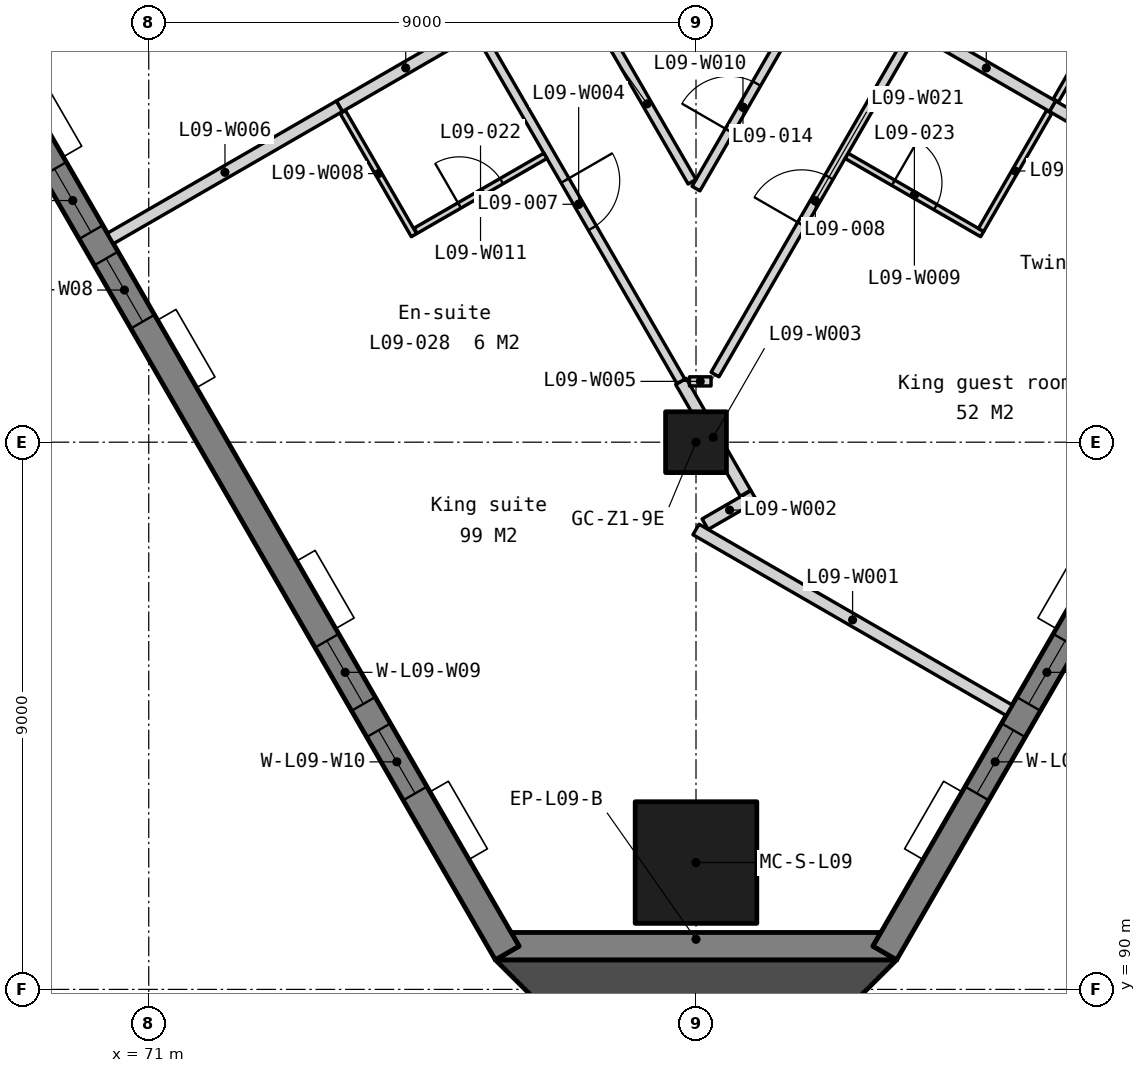
"""IFC4 building model, lengths in metres.
Left out: names, types, materials, properties, quantities, classifications, styles, units other than length and angle.
Written with IfcOpenShell. Run it as: python <this file> out.ifc"""

import sys

from ifc_helpers import new_model, si_unit, direction, frame, frame_2d, origin, origin_2d, place, context, subcontext, project, spatial, polyline, rectangle, outline, extrude, element, fill, save


model = new_model("IFC4")
c1 = context("Model", 3, precision=1e-05, world=origin(), true_north=direction((0.0, 1.0)))
c2 = subcontext(c1, "Body", "Model", "MODEL_VIEW")
j1 = project(units=[si_unit("LENGTHUNIT", "METRE"), si_unit("PLANEANGLEUNIT", "RADIAN")], contexts=[c1])
p1 = place(None, origin())
s1 = spatial("IfcSite", under=j1, at=p1, CompositionType="ELEMENT")
p2 = place(p1, origin())
s2 = spatial("IfcBuilding", under=s1, at=p2, CompositionType="ELEMENT")
p3 = place(p2, frame((0.0, 0.0, 45.5)))
s3 = spatial("IfcBuildingStorey", under=s2, at=p3, CompositionType="ELEMENT", Elevation=45.5)
p4 = place(p3, frame((80.0, 99.0, 0.0), z_axis=(0.0, 0.0, 1.0), x_axis=(1.0, 0.0, 0.0)))
e1 = element("IfcColumn", 1, at=p4, inside=s3, PredefinedType="COLUMN", context=c2, shape_type="SweptSolid", body=[
    extrude(rectangle(XDim=1.0, YDim=1.0, at=origin_2d()), origin(), (0.0, 0.0, 1.0), 3.5),
])
p5 = place(p3, frame((80.0, 92.086, 0.0), z_axis=(0.0, 0.0, 1.0), x_axis=(1.0, 0.0, 0.0)))
e2 = element("IfcColumn", 2, at=p5, inside=s3, PredefinedType="COLUMN", context=c2, shape_type="SweptSolid", body=[
    extrude(rectangle(XDim=2.0, YDim=2.0, at=origin_2d()), origin(), (0.0, 0.0, 1.0), 3.5),
])
p6 = place(p3, frame((0.0, 0.0, -0.15)))
e3 = element("IfcWall", 3, at=p6, inside=s3, PredefinedType="SOLIDWALL", context=c2, shape_type="SweptSolid", body=[
    extrude(outline(polyline([(76.7, 90.486), (77.09, 90.711), (76.96, 90.936), (83.04, 90.936), (82.91, 90.711), (83.3, 90.486), (76.7, 90.486)])), origin(), (0.0, 0.0, 1.0), 3.5),
])
p7 = place(p3, frame((54.495, 129.397, -0.15), z_axis=(0.0, 0.0, 1.0), x_axis=(0.499999201451, -0.866025864826, 0.0)))
e4 = element("IfcWall", 4, at=p7, inside=s3, PredefinedType="SOLIDWALL", context=c2, shape_type="SweptSolid", body=[
    extrude(outline(polyline([(44.8, 0.0), (44.8, 3.5), (0.0, 3.5), (0.0, 0.0), (44.8, 0.0)])), frame((0.0, 0.225, 0.0), z_axis=(0.0, -1.0, 0.0), x_axis=(1.0, 0.0, 0.0)), (0.0, 0.0, 1.0), 0.45),
])
p8 = place(p7, frame((3.03, 0.0, 1.05)))
e5 = element("IfcOpeningElement", 5, at=p8, cuts=e4, PredefinedType="OPENING", context=c2, shape_type="SweptSolid", body=[
    extrude(rectangle(XDim=1.2, YDim=1.5, at=frame_2d((0.6, 0.75))), frame((0.0, 0.235, 0.0), z_axis=(0.0, -1.0, 0.0), x_axis=(1.0, 0.0, 0.0)), (0.0, 0.0, 1.0), 0.47),
])
p9 = place(p7, frame((4.73, 0.0, 1.05)))
e6 = element("IfcOpeningElement", 6, at=p9, cuts=e4, PredefinedType="OPENING", context=c2, shape_type="SweptSolid", body=[
    extrude(rectangle(XDim=1.2, YDim=1.5, at=frame_2d((0.6, 0.75))), frame((0.0, 0.235, 0.0), z_axis=(0.0, -1.0, 0.0), x_axis=(1.0, 0.0, 0.0)), (0.0, 0.0, 1.0), 0.47),
])
p10 = place(p7, frame((11.99, 0.0, 1.05)))
e7 = element("IfcOpeningElement", 7, at=p10, cuts=e4, PredefinedType="OPENING", context=c2, shape_type="SweptSolid", body=[
    extrude(rectangle(XDim=1.2, YDim=1.5, at=frame_2d((0.6, 0.75))), frame((0.0, 0.235, 0.0), z_axis=(0.0, -1.0, 0.0), x_axis=(1.0, 0.0, 0.0)), (0.0, 0.0, 1.0), 0.47),
])
p11 = place(p7, frame((13.69, 0.0, 1.05)))
e8 = element("IfcOpeningElement", 8, at=p11, cuts=e4, PredefinedType="OPENING", context=c2, shape_type="SweptSolid", body=[
    extrude(rectangle(XDim=1.2, YDim=1.5, at=frame_2d((0.6, 0.75))), frame((0.0, 0.235, 0.0), z_axis=(0.0, -1.0, 0.0), x_axis=(1.0, 0.0, 0.0)), (0.0, 0.0, 1.0), 0.47),
])
p12 = place(p7, frame((20.95, 0.0, 1.05)))
e9 = element("IfcOpeningElement", 9, at=p12, cuts=e4, PredefinedType="OPENING", context=c2, shape_type="SweptSolid", body=[
    extrude(rectangle(XDim=1.2, YDim=1.5, at=frame_2d((0.6, 0.75))), frame((0.0, 0.235, 0.0), z_axis=(0.0, -1.0, 0.0), x_axis=(1.0, 0.0, 0.0)), (0.0, 0.0, 1.0), 0.47),
])
p13 = place(p7, frame((22.65, 0.0, 1.05)))
e10 = element("IfcOpeningElement", 10, at=p13, cuts=e4, PredefinedType="OPENING", context=c2, shape_type="SweptSolid", body=[
    extrude(rectangle(XDim=1.2, YDim=1.5, at=frame_2d((0.6, 0.75))), frame((0.0, 0.235, 0.0), z_axis=(0.0, -1.0, 0.0), x_axis=(1.0, 0.0, 0.0)), (0.0, 0.0, 1.0), 0.47),
])
p14 = place(p7, frame((29.91, 0.0, 1.05)))
e11 = element("IfcOpeningElement", 11, at=p14, cuts=e4, PredefinedType="OPENING", context=c2, shape_type="SweptSolid", body=[
    extrude(rectangle(XDim=1.2, YDim=1.5, at=frame_2d((0.6, 0.75))), frame((0.0, 0.235, 0.0), z_axis=(0.0, -1.0, 0.0), x_axis=(1.0, 0.0, 0.0)), (0.0, 0.0, 1.0), 0.47),
])
p15 = place(p7, frame((31.61, 0.0, 1.05)))
e12 = element("IfcOpeningElement", 12, at=p15, cuts=e4, PredefinedType="OPENING", context=c2, shape_type="SweptSolid", body=[
    extrude(rectangle(XDim=1.2, YDim=1.5, at=frame_2d((0.6, 0.75))), frame((0.0, 0.235, 0.0), z_axis=(0.0, -1.0, 0.0), x_axis=(1.0, 0.0, 0.0)), (0.0, 0.0, 1.0), 0.47),
])
p16 = place(p7, frame((38.87, 0.0, 1.05)))
e13 = element("IfcOpeningElement", 13, at=p16, cuts=e4, PredefinedType="OPENING", context=c2, shape_type="SweptSolid", body=[
    extrude(rectangle(XDim=1.2, YDim=1.5, at=frame_2d((0.6, 0.75))), frame((0.0, 0.235, 0.0), z_axis=(0.0, -1.0, 0.0), x_axis=(1.0, 0.0, 0.0)), (0.0, 0.0, 1.0), 0.47),
])
p17 = place(p7, frame((40.57, 0.0, 1.05)))
e14 = element("IfcOpeningElement", 14, at=p17, cuts=e4, PredefinedType="OPENING", context=c2, shape_type="SweptSolid", body=[
    extrude(rectangle(XDim=1.2, YDim=1.5, at=frame_2d((0.6, 0.75))), frame((0.0, 0.235, 0.0), z_axis=(0.0, -1.0, 0.0), x_axis=(1.0, 0.0, 0.0)), (0.0, 0.0, 1.0), 0.47),
])
p18 = place(p3, frame((83.105, 90.599, -0.15), z_axis=(0.0, 0.0, 1.0), x_axis=(0.499999201451, 0.866025864826, 0.0)))
e15 = element("IfcWall", 15, at=p18, inside=s3, PredefinedType="SOLIDWALL", context=c2, shape_type="SweptSolid", body=[
    extrude(outline(polyline([(44.8, 0.0), (44.8, 3.5), (0.0, 3.5), (0.0, 0.0), (44.8, 0.0)])), frame((0.0, 0.225, 0.0), z_axis=(0.0, -1.0, 0.0), x_axis=(1.0, 0.0, 0.0)), (0.0, 0.0, 1.0), 0.45),
])
p19 = place(p18, frame((3.03, 0.0, 1.05)))
e16 = element("IfcOpeningElement", 16, at=p19, cuts=e15, PredefinedType="OPENING", context=c2, shape_type="SweptSolid", body=[
    extrude(rectangle(XDim=1.2, YDim=1.5, at=frame_2d((0.6, 0.75))), frame((0.0, 0.235, 0.0), z_axis=(0.0, -1.0, 0.0), x_axis=(1.0, 0.0, 0.0)), (0.0, 0.0, 1.0), 0.47),
])
p20 = place(p18, frame((4.73, 0.0, 1.05)))
e17 = element("IfcOpeningElement", 17, at=p20, cuts=e15, PredefinedType="OPENING", context=c2, shape_type="SweptSolid", body=[
    extrude(rectangle(XDim=1.2, YDim=1.5, at=frame_2d((0.6, 0.75))), frame((0.0, 0.235, 0.0), z_axis=(0.0, -1.0, 0.0), x_axis=(1.0, 0.0, 0.0)), (0.0, 0.0, 1.0), 0.47),
])
p21 = place(p18, frame((11.99, 0.0, 1.05)))
e18 = element("IfcOpeningElement", 18, at=p21, cuts=e15, PredefinedType="OPENING", context=c2, shape_type="SweptSolid", body=[
    extrude(rectangle(XDim=1.2, YDim=1.5, at=frame_2d((0.6, 0.75))), frame((0.0, 0.235, 0.0), z_axis=(0.0, -1.0, 0.0), x_axis=(1.0, 0.0, 0.0)), (0.0, 0.0, 1.0), 0.47),
])
p22 = place(p18, frame((13.69, 0.0, 1.05)))
e19 = element("IfcOpeningElement", 19, at=p22, cuts=e15, PredefinedType="OPENING", context=c2, shape_type="SweptSolid", body=[
    extrude(rectangle(XDim=1.2, YDim=1.5, at=frame_2d((0.6, 0.75))), frame((0.0, 0.235, 0.0), z_axis=(0.0, -1.0, 0.0), x_axis=(1.0, 0.0, 0.0)), (0.0, 0.0, 1.0), 0.47),
])
p23 = place(p18, frame((20.95, 0.0, 1.05)))
e20 = element("IfcOpeningElement", 20, at=p23, cuts=e15, PredefinedType="OPENING", context=c2, shape_type="SweptSolid", body=[
    extrude(rectangle(XDim=1.2, YDim=1.5, at=frame_2d((0.6, 0.75))), frame((0.0, 0.235, 0.0), z_axis=(0.0, -1.0, 0.0), x_axis=(1.0, 0.0, 0.0)), (0.0, 0.0, 1.0), 0.47),
])
p24 = place(p18, frame((22.65, 0.0, 1.05)))
e21 = element("IfcOpeningElement", 21, at=p24, cuts=e15, PredefinedType="OPENING", context=c2, shape_type="SweptSolid", body=[
    extrude(rectangle(XDim=1.2, YDim=1.5, at=frame_2d((0.6, 0.75))), frame((0.0, 0.235, 0.0), z_axis=(0.0, -1.0, 0.0), x_axis=(1.0, 0.0, 0.0)), (0.0, 0.0, 1.0), 0.47),
])
p25 = place(p18, frame((29.91, 0.0, 1.05)))
e22 = element("IfcOpeningElement", 22, at=p25, cuts=e15, PredefinedType="OPENING", context=c2, shape_type="SweptSolid", body=[
    extrude(rectangle(XDim=1.2, YDim=1.5, at=frame_2d((0.6, 0.75))), frame((0.0, 0.235, 0.0), z_axis=(0.0, -1.0, 0.0), x_axis=(1.0, 0.0, 0.0)), (0.0, 0.0, 1.0), 0.47),
])
p26 = place(p18, frame((31.61, 0.0, 1.05)))
e23 = element("IfcOpeningElement", 23, at=p26, cuts=e15, PredefinedType="OPENING", context=c2, shape_type="SweptSolid", body=[
    extrude(rectangle(XDim=1.2, YDim=1.5, at=frame_2d((0.6, 0.75))), frame((0.0, 0.235, 0.0), z_axis=(0.0, -1.0, 0.0), x_axis=(1.0, 0.0, 0.0)), (0.0, 0.0, 1.0), 0.47),
])
p27 = place(p18, frame((38.87, 0.0, 1.05)))
e24 = element("IfcOpeningElement", 24, at=p27, cuts=e15, PredefinedType="OPENING", context=c2, shape_type="SweptSolid", body=[
    extrude(rectangle(XDim=1.2, YDim=1.5, at=frame_2d((0.6, 0.75))), frame((0.0, 0.235, 0.0), z_axis=(0.0, -1.0, 0.0), x_axis=(1.0, 0.0, 0.0)), (0.0, 0.0, 1.0), 0.47),
])
p28 = place(p18, frame((40.57, 0.0, 1.05)))
e25 = element("IfcOpeningElement", 25, at=p28, cuts=e15, PredefinedType="OPENING", context=c2, shape_type="SweptSolid", body=[
    extrude(rectangle(XDim=1.2, YDim=1.5, at=frame_2d((0.6, 0.75))), frame((0.0, 0.235, 0.0), z_axis=(0.0, -1.0, 0.0), x_axis=(1.0, 0.0, 0.0)), (0.0, 0.0, 1.0), 0.47),
])
p29 = place(p3, frame((0.0, 0.0, -0.15)))
e26 = element("IfcWall", 26, at=p29, inside=s3, PredefinedType="SOLIDWALL", context=c2, shape_type="SweptSolid", body=[
    extrude(outline(polyline([(76.7, 90.486), (80.0, 87.2), (83.3, 90.486), (76.7, 90.486)])), origin(), (0.0, 0.0, 1.0), 3.5),
])
p30 = place(p3, frame((80.0, 97.565, 0.0), z_axis=(0.0, 0.0, 1.0), x_axis=(0.866021515814, -0.500006734102, 0.0)))
e27 = element("IfcWall", 27, at=p30, inside=s3, PredefinedType="PARTITIONING", context=c2, shape_type="SweptSolid", body=[
    extrude(rectangle(XDim=5.947, YDim=0.2, at=frame_2d((2.974, 0.0))), origin(), (0.0, 0.0, 1.0), 3.35),
])
p31 = place(p3, frame((80.15, 97.651, 0.0), z_axis=(0.0, 0.0, 1.0), x_axis=(0.866084982889, 0.499896791762, 0.0)))
e28 = element("IfcWall", 28, at=p31, inside=s3, PredefinedType="PARTITIONING", context=c2, shape_type="SweptSolid", body=[
    extrude(rectangle(XDim=0.929, YDim=0.2, at=frame_2d((0.465, 0.0))), origin(), (0.0, 0.0, 1.0), 3.35),
])
p32 = place(p3, frame((79.752, 100.0, 0.0), z_axis=(0.0, 0.0, 1.0), x_axis=(0.499861813449, -0.866105171129, 0.0)))
e29 = element("IfcWall", 29, at=p32, inside=s3, PredefinedType="PARTITIONING", context=c2, shape_type="SweptSolid", body=[
    extrude(rectangle(XDim=2.123, YDim=0.2, at=frame_2d((1.062, 0.0))), origin(), (0.0, 0.0, 1.0), 3.35),
])
p33 = place(p3, frame((76.389, 105.826, 0.0), z_axis=(0.0, 0.0, 1.0), x_axis=(0.499980071345, -0.866036909293, 0.0)))
e30 = element("IfcWall", 30, at=p33, inside=s3, PredefinedType="PARTITIONING", context=c2, shape_type="SweptSolid", body=[
    extrude(rectangle(XDim=6.727, YDim=0.15, at=frame_2d((3.363, 0.0))), origin(), (0.0, 0.0, 1.0), 3.35),
])
p34 = place(p33, frame((2.914, 0.0, 0.0)))
e31 = element("IfcOpeningElement", 31, at=p34, cuts=e30, PredefinedType="OPENING", context=c2, shape_type="SweptSolid", body=[
    extrude(rectangle(XDim=0.9, YDim=2.1, at=frame_2d((0.45, 1.05))), frame((0.0, 0.085, 0.0), z_axis=(0.0, -1.0, 0.0), x_axis=(1.0, 0.0, 0.0)), (0.0, 0.0, 1.0), 0.17),
])
p35 = place(p3, frame((79.892, 100.0, 0.0), z_axis=(0.0, 0.0, 1.0), x_axis=(1.0, 0.0, 0.0)))
e32 = element("IfcWall", 32, at=p35, inside=s3, PredefinedType="PARTITIONING", context=c2, shape_type="SweptSolid", body=[
    extrude(rectangle(XDim=0.355, YDim=0.15, at=frame_2d((0.178, 0.0))), origin(), (0.0, 0.0, 1.0), 3.35),
])
for number, where, z_axis, x_axis in (
    (33, (70.37, 102.351, 0.0), (0.0, 0.0, 1.0), (0.866, 0.5, 0.0)),
    (34, (85.863, 104.526, 0.0), (0.0, 0.0, 1.0), (0.866, -0.5, 0.0)),
):
    element("IfcWall", number, at=place(p3, frame(where, z_axis=z_axis, x_axis=x_axis)), inside=s3, PredefinedType="PARTITIONING", context=c2, shape_type="SweptSolid", body=[
        extrude(rectangle(XDim=4.35, YDim=0.2, at=frame_2d((2.175, 0.0))), origin(), (0.0, 0.0, 1.0), 3.35),
    ])
p36 = place(p3, frame((74.192, 104.43, 0.0), z_axis=(0.0, 0.0, 1.0), x_axis=(0.499954256575, -0.866051812152, 0.0)))
e35 = element("IfcWall", 35, at=p36, inside=s3, PredefinedType="PARTITIONING", context=c2, shape_type="SweptSolid", body=[
    extrude(rectangle(XDim=2.34, YDim=0.1, at=frame_2d((1.17, 0.0))), origin(), (0.0, 0.0, 1.0), 3.35),
])
p37 = place(p3, frame((82.476, 103.71, 0.0), z_axis=(0.0, 0.0, 1.0), x_axis=(0.866005588531, -0.500034319456, 0.0)))
e36 = element("IfcWall", 36, at=p37, inside=s3, PredefinedType="PARTITIONING", context=c2, shape_type="SweptSolid", body=[
    extrude(rectangle(XDim=2.575, YDim=0.1, at=frame_2d((1.288, 0.0))), origin(), (0.0, 0.0, 1.0), 3.35),
])
p38 = place(p37, frame((0.887, 0.0, 0.0)))
e37 = element("IfcOpeningElement", 37, at=p38, cuts=e36, PredefinedType="OPENING", context=c2, shape_type="SweptSolid", body=[
    extrude(rectangle(XDim=0.8, YDim=2.1, at=frame_2d((0.4, 1.05))), frame((0.0, 0.06, 0.0), z_axis=(0.0, -1.0, 0.0), x_axis=(1.0, 0.0, 0.0)), (0.0, 0.0, 1.0), 0.12),
])
p39 = place(p3, frame((80.0, 103.17, 0.0), z_axis=(0.0, 0.0, 1.0), x_axis=(0.499980071345, 0.866036909293, 0.0)))
e38 = element("IfcWall", 38, at=p39, inside=s3, PredefinedType="PARTITIONING", context=c2, shape_type="SweptSolid", body=[
    extrude(rectangle(XDim=3.09, YDim=0.15, at=frame_2d((1.545, 0.0))), origin(), (0.0, 0.0, 1.0), 3.35),
])
p40 = place(p39, frame((1.095, 0.0, 0.0)))
e39 = element("IfcOpeningElement", 39, at=p40, cuts=e38, PredefinedType="OPENING", context=c2, shape_type="SweptSolid", body=[
    extrude(rectangle(XDim=0.9, YDim=2.1, at=frame_2d((0.45, 1.05))), frame((0.0, 0.085, 0.0), z_axis=(0.0, -1.0, 0.0), x_axis=(1.0, 0.0, 0.0)), (0.0, 0.0, 1.0), 0.17),
])
p41 = place(p3, frame((75.389, 102.477, 0.0), z_axis=(0.0, 0.0, 1.0), x_axis=(0.866040446274, 0.499973944738, 0.0)))
e40 = element("IfcWall", 40, at=p41, inside=s3, PredefinedType="PARTITIONING", context=c2, shape_type="SweptSolid", body=[
    extrude(rectangle(XDim=2.465, YDim=0.1, at=frame_2d((1.232, 0.0))), origin(), (0.0, 0.0, 1.0), 3.35),
])
p42 = place(p41, frame((0.833, 0.0, 0.0)))
e41 = element("IfcOpeningElement", 41, at=p42, cuts=e40, PredefinedType="OPENING", context=c2, shape_type="SweptSolid", body=[
    extrude(rectangle(XDim=0.8, YDim=2.1, at=frame_2d((0.4, 1.05))), frame((0.0, 0.06, 0.0), z_axis=(0.0, -1.0, 0.0), x_axis=(1.0, 0.0, 0.0)), (0.0, 0.0, 1.0), 0.12),
])
p43 = place(p3, frame((84.688, 102.49, 0.0), z_axis=(0.0, 0.0, 1.0), x_axis=(0.500030632641, 0.866007717299, 0.0)))
e42 = element("IfcWall", 42, at=p43, inside=s3, PredefinedType="PARTITIONING", context=c2, shape_type="SweptSolid", body=[
    extrude(rectangle(XDim=2.24, YDim=0.1, at=frame_2d((1.12, 0.0))), origin(), (0.0, 0.0, 1.0), 3.35),
])
for number, where, z_axis, x_axis in (
    (43, (83.685, 105.783, 0.0), (0.0, 0.0, 1.0), (0.866, -0.5, 0.0)),
    (44, (74.137, 104.526, 0.0), (0.0, 0.0, 1.0), (0.866, 0.5, 0.0)),
):
    element("IfcWall", number, at=place(p3, frame(where, z_axis=z_axis, x_axis=x_axis)), inside=s3, PredefinedType="PARTITIONING", context=c2, shape_type="SweptSolid", body=[
        extrude(rectangle(XDim=2.515, YDim=0.2, at=frame_2d((1.257, 0.0))), origin(), (0.0, 0.0, 1.0), 3.35),
    ])
p44 = place(p3, frame((80.313, 100.113, 0.0), z_axis=(0.0, 0.0, 1.0), x_axis=(0.500011833666, 0.866018571506, 0.0)))
e45 = element("IfcWall", 45, at=p44, inside=s3, PredefinedType="PARTITIONING", context=c2, shape_type="SweptSolid", body=[
    extrude(rectangle(XDim=6.597, YDim=0.15, at=frame_2d((3.298, 0.0))), origin(), (0.0, 0.0, 1.0), 3.35),
])
p45 = place(p44, frame((2.849, 0.0, 0.0)))
e46 = element("IfcOpeningElement", 46, at=p45, cuts=e45, PredefinedType="OPENING", context=c2, shape_type="SweptSolid", body=[
    extrude(rectangle(XDim=0.9, YDim=2.1, at=frame_2d((0.45, 1.05))), frame((0.0, 0.085, 0.0), z_axis=(0.0, -1.0, 0.0), x_axis=(1.0, 0.0, 0.0)), (0.0, 0.0, 1.0), 0.17),
])
p46 = place(p3, frame((78.455, 105.846, 0.0), z_axis=(0.0, 0.0, 1.0), x_axis=(0.499988999718, -0.866031754707, 0.0)))
e47 = element("IfcWall", 47, at=p46, inside=s3, PredefinedType="PARTITIONING", context=c2, shape_type="SweptSolid", body=[
    extrude(rectangle(XDim=2.96, YDim=0.15, at=frame_2d((1.48, 0.0))), origin(), (0.0, 0.0, 1.0), 3.35),
])
p47 = place(p3, frame((85.918, 104.621, 0.0), z_axis=(0.0, 0.0, 1.0), x_axis=(0.500032503492, 0.866006637072, 0.0)))
e48 = element("IfcWall", 48, at=p47, inside=s3, PredefinedType="PARTITIONING", context=c2, shape_type="SweptSolid", body=[
    extrude(rectangle(XDim=2.34, YDim=0.1, at=frame_2d((1.17, 0.0))), origin(), (0.0, 0.0, 1.0), 3.35),
])
p48 = place(p14, origin())
e49 = element("IfcWindow", 49, at=p48, inside=s3, PartitioningType="SINGLE_PANEL", PredefinedType="WINDOW", context=c2, shape_type="SweptSolid", body=[
    extrude(rectangle(XDim=1.2, YDim=1.5, at=frame_2d((0.6, 0.75))), frame((0.0, 0.03, 0.0), z_axis=(0.0, -1.0, 0.0), x_axis=(1.0, 0.0, 0.0)), (0.0, 0.0, 1.0), 0.06),
])
fill(e11, e49)
p49 = place(p15, origin())
e50 = element("IfcWindow", 50, at=p49, inside=s3, PartitioningType="SINGLE_PANEL", PredefinedType="WINDOW", context=c2, shape_type="SweptSolid", body=[
    extrude(rectangle(XDim=1.2, YDim=1.5, at=frame_2d((0.6, 0.75))), frame((0.0, 0.03, 0.0), z_axis=(0.0, -1.0, 0.0), x_axis=(1.0, 0.0, 0.0)), (0.0, 0.0, 1.0), 0.06),
])
fill(e12, e50)
p50 = place(p16, origin())
e51 = element("IfcWindow", 51, at=p50, inside=s3, PartitioningType="SINGLE_PANEL", PredefinedType="WINDOW", context=c2, shape_type="SweptSolid", body=[
    extrude(rectangle(XDim=1.2, YDim=1.5, at=frame_2d((0.6, 0.75))), frame((0.0, 0.03, 0.0), z_axis=(0.0, -1.0, 0.0), x_axis=(1.0, 0.0, 0.0)), (0.0, 0.0, 1.0), 0.06),
])
fill(e13, e51)
p51 = place(p17, origin())
e52 = element("IfcWindow", 52, at=p51, inside=s3, PartitioningType="SINGLE_PANEL", PredefinedType="WINDOW", context=c2, shape_type="SweptSolid", body=[
    extrude(rectangle(XDim=1.2, YDim=1.5, at=frame_2d((0.6, 0.75))), frame((0.0, 0.03, 0.0), z_axis=(0.0, -1.0, 0.0), x_axis=(1.0, 0.0, 0.0)), (0.0, 0.0, 1.0), 0.06),
])
fill(e14, e52)
p52 = place(p19, origin())
e53 = element("IfcWindow", 53, at=p52, inside=s3, PartitioningType="SINGLE_PANEL", PredefinedType="WINDOW", context=c2, shape_type="SweptSolid", body=[
    extrude(rectangle(XDim=1.2, YDim=1.5, at=frame_2d((0.6, 0.75))), frame((0.0, 0.03, 0.0), z_axis=(0.0, -1.0, 0.0), x_axis=(1.0, 0.0, 0.0)), (0.0, 0.0, 1.0), 0.06),
])
fill(e16, e53)
p53 = place(p20, origin())
e54 = element("IfcWindow", 54, at=p53, inside=s3, PartitioningType="SINGLE_PANEL", PredefinedType="WINDOW", context=c2, shape_type="SweptSolid", body=[
    extrude(rectangle(XDim=1.2, YDim=1.5, at=frame_2d((0.6, 0.75))), frame((0.0, 0.03, 0.0), z_axis=(0.0, -1.0, 0.0), x_axis=(1.0, 0.0, 0.0)), (0.0, 0.0, 1.0), 0.06),
])
fill(e17, e54)
p54 = place(p34, origin())
e55 = element("IfcDoor", 55, at=p54, inside=s3, OperationType="SINGLE_SWING_LEFT", PredefinedType="DOOR", context=c2, shape_type="SweptSolid", body=[
    extrude(rectangle(XDim=0.9, YDim=2.1, at=frame_2d((0.45, 1.05))), frame((0.0, 0.025, 0.0), z_axis=(0.0, -1.0, 0.0), x_axis=(1.0, 0.0, 0.0)), (0.0, 0.0, 1.0), 0.05),
])
fill(e31, e55)
p55 = place(p45, origin())
e56 = element("IfcDoor", 56, at=p55, inside=s3, OperationType="SINGLE_SWING_LEFT", PredefinedType="DOOR", context=c2, shape_type="SweptSolid", body=[
    extrude(rectangle(XDim=0.9, YDim=2.1, at=frame_2d((0.45, 1.05))), frame((0.0, 0.025, 0.0), z_axis=(0.0, -1.0, 0.0), x_axis=(1.0, 0.0, 0.0)), (0.0, 0.0, 1.0), 0.05),
])
fill(e46, e56)
p56 = place(p40, origin())
e57 = element("IfcDoor", 57, at=p56, inside=s3, OperationType="SINGLE_SWING_LEFT", PredefinedType="DOOR", context=c2, shape_type="SweptSolid", body=[
    extrude(rectangle(XDim=0.9, YDim=2.1, at=frame_2d((0.45, 1.05))), frame((0.0, 0.025, 0.0), z_axis=(0.0, -1.0, 0.0), x_axis=(1.0, 0.0, 0.0)), (0.0, 0.0, 1.0), 0.05),
])
fill(e39, e57)
p57 = place(p42, origin())
e58 = element("IfcDoor", 58, at=p57, inside=s3, OperationType="SINGLE_SWING_LEFT", PredefinedType="DOOR", context=c2, shape_type="SweptSolid", body=[
    extrude(rectangle(XDim=0.8, YDim=2.1, at=frame_2d((0.4, 1.05))), frame((0.0, 0.025, 0.0), z_axis=(0.0, -1.0, 0.0), x_axis=(1.0, 0.0, 0.0)), (0.0, 0.0, 1.0), 0.05),
])
fill(e41, e58)
p58 = place(p38, origin())
e59 = element("IfcDoor", 59, at=p58, inside=s3, OperationType="SINGLE_SWING_LEFT", PredefinedType="DOOR", context=c2, shape_type="SweptSolid", body=[
    extrude(rectangle(XDim=0.8, YDim=2.1, at=frame_2d((0.4, 1.05))), frame((0.0, 0.025, 0.0), z_axis=(0.0, -1.0, 0.0), x_axis=(1.0, 0.0, 0.0)), (0.0, 0.0, 1.0), 0.05),
])
fill(e37, e59)
save(model, sys.argv[1])
